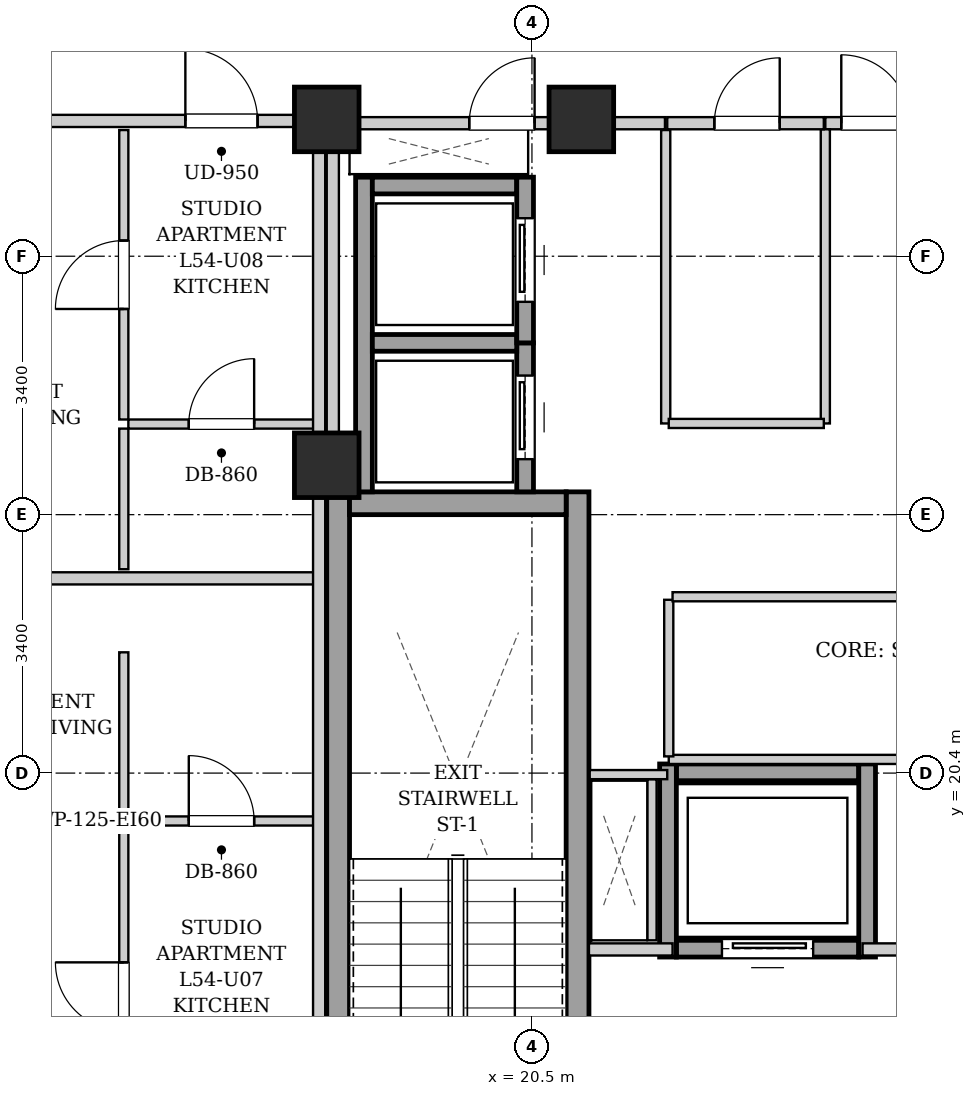
"""IFC4 building model, lengths in metres.
Left out: names, types, materials, properties, quantities, classifications, styles, units other than length and angle.
Written with IfcOpenShell. Run it as: python <this file> out.ifc"""

import sys

from ifc_helpers import new_model, si_unit, direction, frame, frame_2d, origin, origin_2d, place, context, subcontext, project, spatial, rectangle, extrude, element, fill, save


model = new_model("IFC4")
c1 = context("Model", 3, precision=1e-05, world=origin(), true_north=direction((0.0, 1.0)))
c2 = subcontext(c1, "Body", "Model", "MODEL_VIEW")
j1 = project(units=[si_unit("LENGTHUNIT", "METRE"), si_unit("PLANEANGLEUNIT", "RADIAN")], contexts=[c1])
p1 = place(None, origin())
s1 = spatial("IfcSite", under=j1, at=p1, CompositionType="ELEMENT")
p2 = place(p1, origin())
s2 = spatial("IfcBuilding", under=s1, at=p2, CompositionType="ELEMENT")
p3 = place(p2, frame((0.0, 0.0, 187.6)))
s3 = spatial("IfcBuildingStorey", under=s2, at=p3, CompositionType="ELEMENT", Elevation=187.6)
for number, where, z_axis, x_axis in (
    (1, (17.8, 29.0, 0.0), (0.0, 0.0, 1.0), (1.0, 0.0, 0.0)),
    (2, (21.15, 29.0, 0.0), (0.0, 0.0, 1.0), (1.0, 0.0, 0.0)),
    (3, (17.8, 24.45, 0.0), (0.0, 0.0, 1.0), (1.0, 0.0, 0.0)),
):
    element("IfcColumn", number, at=place(p3, frame(where, z_axis=z_axis, x_axis=x_axis)), inside=s3, PredefinedType="COLUMN", context=c2, shape_type="SweptSolid", body=[
        extrude(rectangle(XDim=0.85, YDim=0.85, at=origin_2d()), origin(), (0.0, 0.0, 1.0), 3.3),
    ])
for number, where, z_axis, x_axis in (
    (4, (17.95, 15.1, 0.0), (0.0, 0.0, 1.0), (0.0, 1.0, 0.0)),
    (5, (21.1, 15.1, 0.0), (0.0, 0.0, 1.0), (0.0, 1.0, 0.0)),
):
    element("IfcWall", number, at=place(p3, frame(where, z_axis=z_axis, x_axis=x_axis)), inside=s3, PredefinedType="SHEAR", context=c2, shape_type="SweptSolid", body=[
        extrude(rectangle(XDim=9.0, YDim=0.3, at=frame_2d((4.5, 0.0))), origin(), (0.0, 0.0, 1.0), 3.04),
    ])
p4 = place(p3, frame((18.1, 23.95, 0.0), z_axis=(0.0, 0.0, 1.0), x_axis=(1.0, 0.0, 0.0)))
e6 = element("IfcWall", 6, at=p4, inside=s3, PredefinedType="SHEAR", context=c2, shape_type="SweptSolid", body=[
    extrude(rectangle(XDim=2.85, YDim=0.3, at=frame_2d((1.425, 0.0))), origin(), (0.0, 0.0, 1.0), 3.04),
])
p5 = place(p3, frame((18.29, 24.1, 0.0), z_axis=(0.0, 0.0, 1.0), x_axis=(0.0, 1.0, 0.0)))
e7 = element("IfcWall", 7, at=p5, inside=s3, PredefinedType="SHEAR", context=c2, shape_type="SweptSolid", body=[
    extrude(rectangle(XDim=4.14, YDim=0.22, at=frame_2d((2.07, 0.0))), origin(), (0.0, 0.0, 1.0), 3.04),
])
p6 = place(p3, frame((20.41, 24.1, 0.0), z_axis=(0.0, 0.0, 1.0), x_axis=(0.0, 1.0, 0.0)))
e8 = element("IfcWall", 8, at=p6, inside=s3, PredefinedType="SHEAR", context=c2, shape_type="SweptSolid", body=[
    extrude(rectangle(XDim=1.96, YDim=0.22, at=frame_2d((0.98, 0.0))), origin(), (0.0, 0.0, 1.0), 3.04),
])
p7 = place(p6, frame((0.43, 0.0, 0.0)))
e9 = element("IfcOpeningElement", 9, at=p7, cuts=e8, PredefinedType="OPENING", context=c2, shape_type="SweptSolid", body=[
    extrude(rectangle(XDim=1.1, YDim=2.15, at=frame_2d((0.55, 1.075))), frame((0.0, 0.12, 0.0), z_axis=(0.0, -1.0, 0.0), x_axis=(1.0, 0.0, 0.0)), (0.0, 0.0, 1.0), 0.24),
])
for number, where, z_axis, x_axis in (
    (10, (18.4, 26.06, 0.0), (0.0, 0.0, 1.0), (1.0, 0.0, 0.0)),
    (11, (18.4, 28.13, 0.0), (0.0, 0.0, 1.0), (1.0, 0.0, 0.0)),
):
    element("IfcWall", number, at=place(p3, frame(where, z_axis=z_axis, x_axis=x_axis)), inside=s3, PredefinedType="SHEAR", context=c2, shape_type="SweptSolid", body=[
        extrude(rectangle(XDim=1.9, YDim=0.22, at=frame_2d((0.95, 0.0))), origin(), (0.0, 0.0, 1.0), 3.04),
    ])
p8 = place(p3, frame((20.41, 26.06, 0.0), z_axis=(0.0, 0.0, 1.0), x_axis=(0.0, 1.0, 0.0)))
e12 = element("IfcWall", 12, at=p8, inside=s3, PredefinedType="SHEAR", context=c2, shape_type="SweptSolid", body=[
    extrude(rectangle(XDim=2.18, YDim=0.22, at=frame_2d((1.09, 0.0))), origin(), (0.0, 0.0, 1.0), 3.04),
])
p9 = place(p8, frame((0.54, 0.0, 0.0)))
e13 = element("IfcOpeningElement", 13, at=p9, cuts=e12, PredefinedType="OPENING", context=c2, shape_type="SweptSolid", body=[
    extrude(rectangle(XDim=1.1, YDim=2.15, at=frame_2d((0.55, 1.075))), frame((0.0, 0.12, 0.0), z_axis=(0.0, -1.0, 0.0), x_axis=(1.0, 0.0, 0.0)), (0.0, 0.0, 1.0), 0.24),
])
p10 = place(p3, frame((22.4, 18.09, 0.0), z_axis=(0.0, 0.0, 1.0), x_axis=(1.0, 0.0, 0.0)))
e14 = element("IfcWall", 14, at=p10, inside=s3, PredefinedType="SHEAR", context=c2, shape_type="SweptSolid", body=[
    extrude(rectangle(XDim=2.4, YDim=0.22, at=frame_2d((1.2, 0.0))), origin(), (0.0, 0.0, 1.0), 3.04),
])
p11 = place(p10, frame((0.6, 0.0, 0.0)))
e15 = element("IfcOpeningElement", 15, at=p11, cuts=e14, PredefinedType="OPENING", context=c2, shape_type="SweptSolid", body=[
    extrude(rectangle(XDim=1.2, YDim=2.15, at=frame_2d((0.6, 1.075))), frame((0.0, 0.12, 0.0), z_axis=(0.0, -1.0, 0.0), x_axis=(1.0, 0.0, 0.0)), (0.0, 0.0, 1.0), 0.24),
])
p12 = place(p3, frame((22.4, 20.41, 0.0), z_axis=(0.0, 0.0, 1.0), x_axis=(1.0, 0.0, 0.0)))
e16 = element("IfcWall", 16, at=p12, inside=s3, PredefinedType="SHEAR", context=c2, shape_type="SweptSolid", body=[
    extrude(rectangle(XDim=2.4, YDim=0.22, at=frame_2d((1.2, 0.0))), origin(), (0.0, 0.0, 1.0), 3.04),
])
for number, where, z_axis, x_axis in (
    (17, (22.29, 17.98, 0.0), (0.0, 0.0, 1.0), (0.0, 1.0, 0.0)),
    (18, (24.91, 17.98, 0.0), (0.0, 0.0, 1.0), (0.0, 1.0, 0.0)),
):
    element("IfcWall", number, at=place(p3, frame(where, z_axis=z_axis, x_axis=x_axis)), inside=s3, PredefinedType="SHEAR", context=c2, shape_type="SweptSolid", body=[
        extrude(rectangle(XDim=2.54, YDim=0.22, at=frame_2d((1.27, 0.0))), origin(), (0.0, 0.0, 1.0), 3.04),
    ])
p13 = place(p3, frame((21.25, 18.08, 0.0), z_axis=(0.0, 0.0, 1.0), x_axis=(1.0, 0.0, 0.0)))
e19 = element("IfcWall", 19, at=p13, inside=s3, PredefinedType="PARTITIONING", context=c2, shape_type="SweptSolid", body=[
    extrude(rectangle(XDim=1.1, YDim=0.16, at=frame_2d((0.55, 0.0))), origin(), (0.0, 0.0, 1.0), 3.04),
])
p14 = place(p3, frame((24.85, 18.08, 0.0), z_axis=(0.0, 0.0, 1.0), x_axis=(1.0, 0.0, 0.0)))
e20 = element("IfcWall", 20, at=p14, inside=s3, PredefinedType="PARTITIONING", context=c2, shape_type="SweptSolid", body=[
    extrude(rectangle(XDim=1.3, YDim=0.16, at=frame_2d((0.65, 0.0))), origin(), (0.0, 0.0, 1.0), 3.04),
])
p15 = place(p3, frame((17.88, 24.12, 0.0), z_axis=(0.0, 0.0, 1.0), x_axis=(0.0, 1.0, 0.0)))
e21 = element("IfcWall", 21, at=p15, inside=s3, PredefinedType="PARTITIONING", context=c2, shape_type="SweptSolid", body=[
    extrude(rectangle(XDim=4.76, YDim=0.16, at=frame_2d((2.38, 0.0))), origin(), (0.0, 0.0, 1.0), 2.375),
])
p16 = place(p3, frame((24.36, 28.95, 0.0), z_axis=(0.0, 0.0, 1.0), x_axis=(1.0, 0.0, 0.0)))
e22 = element("IfcWall", 22, at=p16, inside=s3, PredefinedType="PARTITIONING", context=c2, shape_type="SweptSolid", body=[
    extrude(rectangle(XDim=1.32, YDim=0.16, at=frame_2d((0.66, 0.0))), origin(), (0.0, 0.0, 1.0), 2.556),
])
p17 = place(p16, frame((0.21, 0.0, 0.0)))
e23 = element("IfcOpeningElement", 23, at=p17, cuts=e22, PredefinedType="OPENING", context=c2, shape_type="SweptSolid", body=[
    extrude(rectangle(XDim=0.9, YDim=2.05, at=frame_2d((0.45, 1.025))), frame((0.0, 0.09, 0.0), z_axis=(0.0, -1.0, 0.0), x_axis=(1.0, 0.0, 0.0)), (0.0, 0.0, 1.0), 0.18),
])
p18 = place(p3, frame((17.96, 28.95, 0.0), z_axis=(0.0, 0.0, 1.0), x_axis=(1.0, 0.0, 0.0)))
e24 = element("IfcWall", 24, at=p18, inside=s3, PredefinedType="PARTITIONING", context=c2, shape_type="SweptSolid", body=[
    extrude(rectangle(XDim=4.29, YDim=0.16, at=frame_2d((2.145, 0.0))), origin(), (0.0, 0.0, 1.0), 2.556),
])
p19 = place(p18, frame((1.715, 0.0, 0.0)))
e25 = element("IfcOpeningElement", 25, at=p19, cuts=e24, PredefinedType="OPENING", context=c2, shape_type="SweptSolid", body=[
    extrude(rectangle(XDim=0.86, YDim=2.05, at=frame_2d((0.43, 1.025))), frame((0.0, 0.09, 0.0), z_axis=(0.0, -1.0, 0.0), x_axis=(1.0, 0.0, 0.0)), (0.0, 0.0, 1.0), 0.18),
])
p20 = place(p3, frame((22.08, 18.2, 0.0), z_axis=(0.0, 0.0, 1.0), x_axis=(0.0, 1.0, 0.0)))
e26 = element("IfcWall", 26, at=p20, inside=s3, PredefinedType="PARTITIONING", context=c2, shape_type="SweptSolid", body=[
    extrude(rectangle(XDim=2.12, YDim=0.12, at=frame_2d((1.06, 0.0))), origin(), (0.0, 0.0, 1.0), 3.04),
])
p21 = place(p3, frame((22.28, 20.38, 0.0), z_axis=(0.0, 0.0, 1.0), x_axis=(-1.0, 0.0, 0.0)))
e27 = element("IfcWall", 27, at=p21, inside=s3, PredefinedType="PARTITIONING", context=c2, shape_type="SweptSolid", body=[
    extrude(rectangle(XDim=1.02, YDim=0.12, at=frame_2d((0.51, 0.0))), origin(), (0.0, 0.0, 1.0), 3.04),
])
p22 = place(p3, frame((24.36, 25.0, 0.0), z_axis=(0.0, 0.0, 1.0), x_axis=(0.0, 1.0, 0.0)))
e28 = element("IfcWall", 28, at=p22, inside=s3, PredefinedType="PARTITIONING", context=c2, shape_type="SweptSolid", body=[
    extrude(rectangle(XDim=3.87, YDim=0.12, at=frame_2d((1.935, 0.0))), origin(), (0.0, 0.0, 1.0), 3.04),
])
p23 = place(p3, frame((22.26, 25.0, 0.0), z_axis=(0.0, 0.0, 1.0), x_axis=(0.0, 1.0, 0.0)))
e29 = element("IfcWall", 29, at=p23, inside=s3, PredefinedType="PARTITIONING", context=c2, shape_type="SweptSolid", body=[
    extrude(rectangle(XDim=3.86, YDim=0.12, at=frame_2d((1.93, 0.0))), origin(), (0.0, 0.0, 1.0), 3.04),
])
p24 = place(p3, frame((22.3, 25.0, 0.0), z_axis=(0.0, 0.0, 1.0), x_axis=(1.0, 0.0, 0.0)))
e30 = element("IfcWall", 30, at=p24, inside=s3, PredefinedType="PARTITIONING", context=c2, shape_type="SweptSolid", body=[
    extrude(rectangle(XDim=2.04, YDim=0.12, at=frame_2d((1.02, 0.0))), origin(), (0.0, 0.0, 1.0), 3.04),
])
p25 = place(p3, frame((22.28, 28.95, 0.0), z_axis=(0.0, 0.0, 1.0), x_axis=(1.0, 0.0, 0.0)))
e31 = element("IfcWall", 31, at=p25, inside=s3, PredefinedType="PARTITIONING", context=c2, shape_type="SweptSolid", body=[
    extrude(rectangle(XDim=2.06, YDim=0.16, at=frame_2d((1.03, 0.0))), origin(), (0.0, 0.0, 1.0), 2.556),
])
p26 = place(p25, frame((0.62, 0.0, 0.0)))
e32 = element("IfcOpeningElement", 32, at=p26, cuts=e31, PredefinedType="OPENING", context=c2, shape_type="SweptSolid", body=[
    extrude(rectangle(XDim=0.86, YDim=2.05, at=frame_2d((0.43, 1.025))), frame((0.0, 0.09, 0.0), z_axis=(0.0, -1.0, 0.0), x_axis=(1.0, 0.0, 0.0)), (0.0, 0.0, 1.0), 0.18),
])
p27 = place(p3, frame((22.3, 20.58, 0.0), z_axis=(0.0, 0.0, 1.0), x_axis=(1.0, 0.0, 0.0)))
e33 = element("IfcWall", 33, at=p27, inside=s3, PredefinedType="PARTITIONING", context=c2, shape_type="SweptSolid", body=[
    extrude(rectangle(XDim=7.35, YDim=0.12, at=frame_2d((3.675, 0.0))), origin(), (0.0, 0.0, 1.0), 3.04),
])
p28 = place(p3, frame((22.3, 20.62, 0.0), z_axis=(0.0, 0.0, 1.0), x_axis=(0.0, 1.0, 0.0)))
e34 = element("IfcWall", 34, at=p28, inside=s3, PredefinedType="PARTITIONING", context=c2, shape_type="SweptSolid", body=[
    extrude(rectangle(XDim=2.06, YDim=0.12, at=frame_2d((1.03, 0.0))), origin(), (0.0, 0.0, 1.0), 3.04),
])
p29 = place(p3, frame((22.35, 22.72, 0.0), z_axis=(0.0, 0.0, 1.0), x_axis=(1.0, 0.0, 0.0)))
e35 = element("IfcWall", 35, at=p29, inside=s3, PredefinedType="PARTITIONING", context=c2, shape_type="SweptSolid", body=[
    extrude(rectangle(XDim=7.27, YDim=0.12, at=frame_2d((3.635, 0.0))), origin(), (0.0, 0.0, 1.0), 3.04),
])
p30 = place(p29, frame((3.25, 0.0, 0.0)))
e36 = element("IfcOpeningElement", 36, at=p30, cuts=e35, PredefinedType="OPENING", context=c2, shape_type="SweptSolid", body=[
    extrude(rectangle(XDim=0.9, YDim=2.05, at=frame_2d((0.45, 1.025))), frame((0.0, 0.07, 0.0), z_axis=(0.0, -1.0, 0.0), x_axis=(1.0, 0.0, 0.0)), (0.0, 0.0, 1.0), 0.14),
])
p31 = place(p3, frame((10.88, 22.962, 0.0), z_axis=(0.0, 0.0, 1.0), x_axis=(1.0, 0.0, 0.0)))
e37 = element("IfcWall", 37, at=p31, inside=s3, PredefinedType="PARTITIONING", context=c2, shape_type="SweptSolid", body=[
    extrude(rectangle(XDim=6.76, YDim=0.16, at=frame_2d((3.38, 0.0))), origin(), (0.0, 0.0, 1.0), 3.04),
])
p32 = place(p3, frame((15.19, 19.77, 0.0), z_axis=(0.0, 0.0, 1.0), x_axis=(1.0, 0.0, 0.0)))
e38 = element("IfcWall", 38, at=p32, inside=s3, PredefinedType="PARTITIONING", context=c2, shape_type="SweptSolid", body=[
    extrude(rectangle(XDim=2.45, YDim=0.12, at=frame_2d((1.225, 0.0))), origin(), (0.0, 0.0, 1.0), 3.04),
])
p33 = place(p32, frame((0.795, 0.0, 0.0)))
e39 = element("IfcOpeningElement", 39, at=p33, cuts=e38, PredefinedType="OPENING", context=c2, shape_type="SweptSolid", body=[
    extrude(rectangle(XDim=0.86, YDim=2.05, at=frame_2d((0.43, 1.025))), frame((0.0, 0.07, 0.0), z_axis=(0.0, -1.0, 0.0), x_axis=(1.0, 0.0, 0.0)), (0.0, 0.0, 1.0), 0.14),
])
p34 = place(p3, frame((15.13, 19.83, 0.0), z_axis=(0.0, 0.0, 1.0), x_axis=(0.0, 1.0, 0.0)))
e40 = element("IfcWall", 40, at=p34, inside=s3, PredefinedType="PARTITIONING", context=c2, shape_type="SweptSolid", body=[
    extrude(rectangle(XDim=2.159, YDim=0.12, at=frame_2d((1.08, 0.0))), origin(), (0.0, 0.0, 1.0), 3.04),
])
p35 = place(p3, frame((15.13, 15.21, 0.0), z_axis=(0.0, 0.0, 1.0), x_axis=(0.0, 1.0, 0.0)))
e41 = element("IfcWall", 41, at=p35, inside=s3, PredefinedType="PARTITIONING", context=c2, shape_type="SweptSolid", body=[
    extrude(rectangle(XDim=4.5, YDim=0.12, at=frame_2d((2.25, 0.0))), origin(), (0.0, 0.0, 1.0), 3.04),
])
p36 = place(p35, frame((1.8, 0.0, 0.0)))
e42 = element("IfcOpeningElement", 42, at=p36, cuts=e41, PredefinedType="OPENING", context=c2, shape_type="SweptSolid", body=[
    extrude(rectangle(XDim=0.9, YDim=2.05, at=frame_2d((0.45, 1.025))), frame((0.0, 0.07, 0.0), z_axis=(0.0, -1.0, 0.0), x_axis=(1.0, 0.0, 0.0)), (0.0, 0.0, 1.0), 0.14),
])
p37 = place(p3, frame((10.88, 28.98, 0.0), z_axis=(0.0, 0.0, 1.0), x_axis=(1.0, 0.0, 0.0)))
e43 = element("IfcWall", 43, at=p37, inside=s3, PredefinedType="PARTITIONING", context=c2, shape_type="SweptSolid", body=[
    extrude(rectangle(XDim=6.88, YDim=0.16, at=frame_2d((3.44, 0.0))), origin(), (0.0, 0.0, 1.0), 2.556),
])
p38 = place(p37, frame((5.06, 0.0, 0.0)))
e44 = element("IfcOpeningElement", 44, at=p38, cuts=e43, PredefinedType="OPENING", context=c2, shape_type="SweptSolid", body=[
    extrude(rectangle(XDim=0.95, YDim=2.1, at=frame_2d((0.475, 1.05))), frame((0.0, 0.09, 0.0), z_axis=(0.0, -1.0, 0.0), x_axis=(1.0, 0.0, 0.0)), (0.0, 0.0, 1.0), 0.18),
])
p39 = place(p3, frame((15.19, 24.992, 0.0), z_axis=(0.0, 0.0, 1.0), x_axis=(1.0, 0.0, 0.0)))
e45 = element("IfcWall", 45, at=p39, inside=s3, PredefinedType="PARTITIONING", context=c2, shape_type="SweptSolid", body=[
    extrude(rectangle(XDim=2.45, YDim=0.12, at=frame_2d((1.225, 0.0))), origin(), (0.0, 0.0, 1.0), 3.04),
])
p40 = place(p39, frame((0.795, 0.0, 0.0)))
e46 = element("IfcOpeningElement", 46, at=p40, cuts=e45, PredefinedType="OPENING", context=c2, shape_type="SweptSolid", body=[
    extrude(rectangle(XDim=0.86, YDim=2.05, at=frame_2d((0.43, 1.025))), frame((0.0, 0.07, 0.0), z_axis=(0.0, -1.0, 0.0), x_axis=(1.0, 0.0, 0.0)), (0.0, 0.0, 1.0), 0.14),
])
p41 = place(p3, frame((15.13, 23.082, 0.0), z_axis=(0.0, 0.0, 1.0), x_axis=(0.0, 1.0, 0.0)))
e47 = element("IfcWall", 47, at=p41, inside=s3, PredefinedType="PARTITIONING", context=c2, shape_type="SweptSolid", body=[
    extrude(rectangle(XDim=1.85, YDim=0.12, at=frame_2d((0.925, 0.0))), origin(), (0.0, 0.0, 1.0), 3.04),
])
p42 = place(p3, frame((15.13, 25.052, 0.0), z_axis=(0.0, 0.0, 1.0), x_axis=(0.0, 1.0, 0.0)))
e48 = element("IfcWall", 48, at=p42, inside=s3, PredefinedType="PARTITIONING", context=c2, shape_type="SweptSolid", body=[
    extrude(rectangle(XDim=3.808, YDim=0.12, at=frame_2d((1.904, 0.0))), origin(), (0.0, 0.0, 1.0), 3.04),
])
p43 = place(p42, frame((1.454, 0.0, 0.0)))
e49 = element("IfcOpeningElement", 49, at=p43, cuts=e48, PredefinedType="OPENING", context=c2, shape_type="SweptSolid", body=[
    extrude(rectangle(XDim=0.9, YDim=2.05, at=frame_2d((0.45, 1.025))), frame((0.0, 0.07, 0.0), z_axis=(0.0, -1.0, 0.0), x_axis=(1.0, 0.0, 0.0)), (0.0, 0.0, 1.0), 0.14),
])
p44 = place(p3, frame((17.7, 15.02, 0.0), z_axis=(0.0, 0.0, 1.0), x_axis=(0.0, 1.0, 0.0)))
e50 = element("IfcWall", 50, at=p44, inside=s3, PredefinedType="PARTITIONING", context=c2, shape_type="SweptSolid", body=[
    extrude(rectangle(XDim=13.98, YDim=0.16, at=frame_2d((6.99, 0.0))), origin(), (0.0, 0.0, 1.0), 2.375),
])
p45 = place(p7, origin())
e51 = element("IfcDoor", 51, at=p45, inside=s3, OperationType="SLIDING_TO_LEFT", PredefinedType="DOOR", context=c2, shape_type="SweptSolid", body=[
    extrude(rectangle(XDim=1.1, YDim=2.15, at=frame_2d((0.55, 1.075))), frame((0.0, 0.025, 0.0), z_axis=(0.0, -1.0, 0.0), x_axis=(1.0, 0.0, 0.0)), (0.0, 0.0, 1.0), 0.05),
])
fill(e9, e51)
p46 = place(p9, origin())
e52 = element("IfcDoor", 52, at=p46, inside=s3, OperationType="SLIDING_TO_LEFT", PredefinedType="DOOR", context=c2, shape_type="SweptSolid", body=[
    extrude(rectangle(XDim=1.1, YDim=2.15, at=frame_2d((0.55, 1.075))), frame((0.0, 0.025, 0.0), z_axis=(0.0, -1.0, 0.0), x_axis=(1.0, 0.0, 0.0)), (0.0, 0.0, 1.0), 0.05),
])
fill(e13, e52)
p47 = place(p11, origin())
e53 = element("IfcDoor", 53, at=p47, inside=s3, OperationType="SLIDING_TO_LEFT", PredefinedType="DOOR", context=c2, shape_type="SweptSolid", body=[
    extrude(rectangle(XDim=1.2, YDim=2.15, at=frame_2d((0.6, 1.075))), frame((0.0, 0.025, 0.0), z_axis=(0.0, -1.0, 0.0), x_axis=(1.0, 0.0, 0.0)), (0.0, 0.0, 1.0), 0.05),
])
fill(e15, e53)
p48 = place(p17, origin())
e54 = element("IfcDoor", 54, at=p48, inside=s3, OperationType="SINGLE_SWING_LEFT", PredefinedType="DOOR", context=c2, shape_type="SweptSolid", body=[
    extrude(rectangle(XDim=0.9, YDim=2.05, at=frame_2d((0.45, 1.025))), frame((0.0, 0.025, 0.0), z_axis=(0.0, -1.0, 0.0), x_axis=(1.0, 0.0, 0.0)), (0.0, 0.0, 1.0), 0.05),
])
fill(e23, e54)
p49 = place(p19, origin())
e55 = element("IfcDoor", 55, at=p49, inside=s3, OperationType="SINGLE_SWING_RIGHT", PredefinedType="DOOR", context=c2, shape_type="SweptSolid", body=[
    extrude(rectangle(XDim=0.86, YDim=2.05, at=frame_2d((0.43, 1.025))), frame((0.0, 0.025, 0.0), z_axis=(0.0, -1.0, 0.0), x_axis=(1.0, 0.0, 0.0)), (0.0, 0.0, 1.0), 0.05),
])
fill(e25, e55)
p50 = place(p26, origin())
e56 = element("IfcDoor", 56, at=p50, inside=s3, OperationType="SINGLE_SWING_RIGHT", PredefinedType="DOOR", context=c2, shape_type="SweptSolid", body=[
    extrude(rectangle(XDim=0.86, YDim=2.05, at=frame_2d((0.43, 1.025))), frame((0.0, 0.025, 0.0), z_axis=(0.0, -1.0, 0.0), x_axis=(1.0, 0.0, 0.0)), (0.0, 0.0, 1.0), 0.05),
])
fill(e32, e56)
p51 = place(p33, origin())
e57 = element("IfcDoor", 57, at=p51, inside=s3, OperationType="SINGLE_SWING_LEFT", PredefinedType="DOOR", context=c2, shape_type="SweptSolid", body=[
    extrude(rectangle(XDim=0.86, YDim=2.05, at=frame_2d((0.43, 1.025))), frame((0.0, 0.025, 0.0), z_axis=(0.0, -1.0, 0.0), x_axis=(1.0, 0.0, 0.0)), (0.0, 0.0, 1.0), 0.05),
])
fill(e39, e57)
p52 = place(p36, origin())
e58 = element("IfcDoor", 58, at=p52, inside=s3, OperationType="SINGLE_SWING_RIGHT", PredefinedType="DOOR", context=c2, shape_type="SweptSolid", body=[
    extrude(rectangle(XDim=0.9, YDim=2.05, at=frame_2d((0.45, 1.025))), frame((0.0, 0.025, 0.0), z_axis=(0.0, -1.0, 0.0), x_axis=(1.0, 0.0, 0.0)), (0.0, 0.0, 1.0), 0.05),
])
fill(e42, e58)
p53 = place(p38, origin())
e59 = element("IfcDoor", 59, at=p53, inside=s3, OperationType="SINGLE_SWING_LEFT", PredefinedType="DOOR", context=c2, shape_type="SweptSolid", body=[
    extrude(rectangle(XDim=0.95, YDim=2.1, at=frame_2d((0.475, 1.05))), frame((0.0, 0.025, 0.0), z_axis=(0.0, -1.0, 0.0), x_axis=(1.0, 0.0, 0.0)), (0.0, 0.0, 1.0), 0.05),
])
fill(e44, e59)
p54 = place(p40, origin())
e60 = element("IfcDoor", 60, at=p54, inside=s3, OperationType="SINGLE_SWING_RIGHT", PredefinedType="DOOR", context=c2, shape_type="SweptSolid", body=[
    extrude(rectangle(XDim=0.86, YDim=2.05, at=frame_2d((0.43, 1.025))), frame((0.0, 0.025, 0.0), z_axis=(0.0, -1.0, 0.0), x_axis=(1.0, 0.0, 0.0)), (0.0, 0.0, 1.0), 0.05),
])
fill(e46, e60)
p55 = place(p43, origin())
e61 = element("IfcDoor", 61, at=p55, inside=s3, OperationType="SINGLE_SWING_LEFT", PredefinedType="DOOR", context=c2, shape_type="SweptSolid", body=[
    extrude(rectangle(XDim=0.9, YDim=2.05, at=frame_2d((0.45, 1.025))), frame((0.0, 0.025, 0.0), z_axis=(0.0, -1.0, 0.0), x_axis=(1.0, 0.0, 0.0)), (0.0, 0.0, 1.0), 0.05),
])
fill(e49, e61)
save(model, sys.argv[1])
